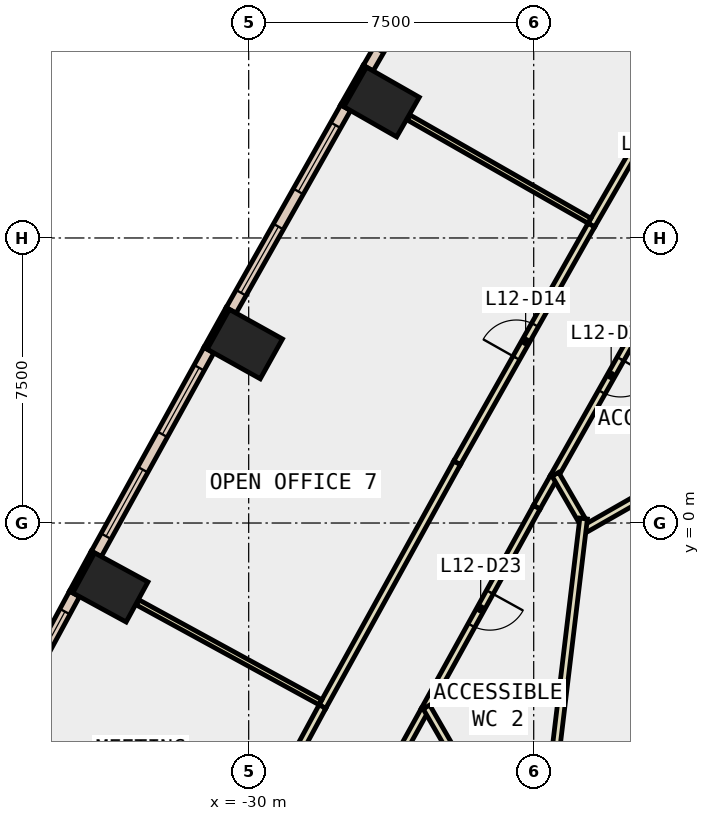
"""IFC4 building model, lengths in metres.
Left out: names, types, materials, properties, quantities, classifications, styles, units other than length and angle.
Written with IfcOpenShell. Run it as: python <this file> out.ifc"""

import sys

from ifc_helpers import new_model, si_unit, direction, frame, frame_2d, origin, origin_2d, place, context, subcontext, project, spatial, rectangle, extrude, element, fill, save


model = new_model("IFC4")
c1 = context("Model", 3, precision=1e-05, world=origin(), true_north=direction((0.0, 1.0)))
c2 = subcontext(c1, "Body", "Model", "MODEL_VIEW")
j1 = project(units=[si_unit("LENGTHUNIT", "METRE"), si_unit("PLANEANGLEUNIT", "RADIAN")], contexts=[c1])
p1 = place(None, origin())
s1 = spatial("IfcSite", under=j1, at=p1, CompositionType="ELEMENT")
p2 = place(p1, origin())
s2 = spatial("IfcBuilding", under=s1, at=p2, CompositionType="ELEMENT")
p3 = place(p2, frame((0.0, 0.0, 60.2)))
s3 = spatial("IfcBuildingStorey", under=s2, at=p3, CompositionType="ELEMENT", Elevation=60.2)
for number, where, z_axis, x_axis in (
    (1, (-26.503, 11.078, -0.4), (0.0, 0.0, 1.0), (0.496, 0.869, 0.0)),
    (2, (-30.102, 4.708, -0.4), (0.0, 0.0, 1.0), (0.487, 0.873, 0.0)),
    (3, (-33.64, -1.695, -0.4), (0.0, 0.0, 1.0), (0.478, 0.878, 0.0)),
):
    element("IfcColumn", number, at=place(p3, frame(where, z_axis=z_axis, x_axis=x_axis)), inside=s3, PredefinedType="COLUMN", context=c2, shape_type="SweptSolid", body=[
        extrude(rectangle(XDim=1.2, YDim=1.6, at=origin_2d()), origin(), (0.0, 0.0, 1.0), 4.2),
    ])
p4 = place(p3, frame((-26.944, 12.02, 0.0), z_axis=(0.0, 0.0, 1.0), x_axis=(-0.495854054996, -0.868405870629, 0.0)))
e4 = element("IfcWall", 4, at=p4, inside=s3, PredefinedType="STANDARD", context=c2, shape_type="SweptSolid", body=[
    extrude(rectangle(XDim=1.2, YDim=0.1, at=frame_2d((0.6, 0.0))), origin(), (0.0, 0.0, 1.0), 3.8),
])
p5 = place(p3, frame((-30.552, 5.646, 0.0), z_axis=(0.0, 0.0, 1.0), x_axis=(-0.486730996044, -0.87355190887, 0.0)))
e5 = element("IfcWall", 5, at=p5, inside=s3, PredefinedType="STANDARD", context=c2, shape_type="SweptSolid", body=[
    extrude(rectangle(XDim=1.2, YDim=0.1, at=frame_2d((0.6, 0.0))), origin(), (0.0, 0.0, 1.0), 3.8),
])
p6 = place(p3, frame((-34.099, -0.762, 0.0), z_axis=(0.0, 0.0, 1.0), x_axis=(-0.478267644701, -0.878214131082, 0.0)))
e6 = element("IfcWall", 6, at=p6, inside=s3, PredefinedType="STANDARD", context=c2, shape_type="SweptSolid", body=[
    extrude(rectangle(XDim=1.2, YDim=0.1, at=frame_2d((0.6, 0.0))), origin(), (0.0, 0.0, 1.0), 3.8),
])
p7 = place(p3, frame((-23.793, 17.273, 0.0), z_axis=(0.0, 0.0, 1.0), x_axis=(-0.499903021601, -0.86608138705, 0.0)))
e7 = element("IfcWall", 7, at=p7, inside=s3, PredefinedType="STANDARD", context=c2, shape_type="SweptSolid", body=[
    extrude(rectangle(XDim=6.125, YDim=0.3, at=frame_2d((3.062, 0.0))), origin(), (0.0, 0.0, 1.0), 3.8),
])
p8 = place(p7, frame((0.531, 0.0, 0.9)))
e8 = element("IfcOpeningElement", 8, at=p8, cuts=e7, PredefinedType="OPENING", context=c2, shape_type="SweptSolid", body=[
    extrude(rectangle(XDim=2.0, YDim=2.6, at=frame_2d((1.0, 1.3))), frame((0.0, 0.16, 0.0), z_axis=(0.0, -1.0, 0.0), x_axis=(1.0, 0.0, 0.0)), (0.0, 0.0, 1.0), 0.32),
])
p9 = place(p7, frame((3.594, 0.0, 0.9)))
e9 = element("IfcOpeningElement", 9, at=p9, cuts=e7, PredefinedType="OPENING", context=c2, shape_type="SweptSolid", body=[
    extrude(rectangle(XDim=2.0, YDim=2.6, at=frame_2d((1.0, 1.3))), frame((0.0, 0.16, 0.0), z_axis=(0.0, -1.0, 0.0), x_axis=(1.0, 0.0, 0.0)), (0.0, 0.0, 1.0), 0.32),
])
p10 = place(p3, frame((-27.449, 10.928, 0.0), z_axis=(0.0, 0.0, 1.0), x_axis=(-0.491887822214, -0.870658584267, 0.0)))
e10 = element("IfcWall", 10, at=p10, inside=s3, PredefinedType="STANDARD", context=c2, shape_type="SweptSolid", body=[
    extrude(rectangle(XDim=6.125, YDim=0.3, at=frame_2d((3.062, 0.0))), origin(), (0.0, 0.0, 1.0), 3.8),
])
p11 = place(p10, frame((0.531, 0.0, 0.9)))
e11 = element("IfcOpeningElement", 11, at=p11, cuts=e10, PredefinedType="OPENING", context=c2, shape_type="SweptSolid", body=[
    extrude(rectangle(XDim=2.0, YDim=2.6, at=frame_2d((1.0, 1.3))), frame((0.0, 0.16, 0.0), z_axis=(0.0, -1.0, 0.0), x_axis=(1.0, 0.0, 0.0)), (0.0, 0.0, 1.0), 0.32),
])
p12 = place(p10, frame((3.594, 0.0, 0.9)))
e12 = element("IfcOpeningElement", 12, at=p12, cuts=e10, PredefinedType="OPENING", context=c2, shape_type="SweptSolid", body=[
    extrude(rectangle(XDim=2.0, YDim=2.6, at=frame_2d((1.0, 1.3))), frame((0.0, 0.16, 0.0), z_axis=(0.0, -1.0, 0.0), x_axis=(1.0, 0.0, 0.0)), (0.0, 0.0, 1.0), 0.32),
])
p13 = place(p3, frame((-31.047, 4.549, 0.0), z_axis=(0.0, 0.0, 1.0), x_axis=(-0.483587271547, -0.875296150339, 0.0)))
e13 = element("IfcWall", 13, at=p13, inside=s3, PredefinedType="STANDARD", context=c2, shape_type="SweptSolid", body=[
    extrude(rectangle(XDim=6.125, YDim=0.3, at=frame_2d((3.062, 0.0))), origin(), (0.0, 0.0, 1.0), 3.8),
])
p14 = place(p13, frame((0.531, 0.0, 0.9)))
e14 = element("IfcOpeningElement", 14, at=p14, cuts=e13, PredefinedType="OPENING", context=c2, shape_type="SweptSolid", body=[
    extrude(rectangle(XDim=2.0, YDim=2.6, at=frame_2d((1.0, 1.3))), frame((0.0, 0.16, 0.0), z_axis=(0.0, -1.0, 0.0), x_axis=(1.0, 0.0, 0.0)), (0.0, 0.0, 1.0), 0.32),
])
p15 = place(p13, frame((3.594, 0.0, 0.9)))
e15 = element("IfcOpeningElement", 15, at=p15, cuts=e13, PredefinedType="OPENING", context=c2, shape_type="SweptSolid", body=[
    extrude(rectangle(XDim=2.0, YDim=2.6, at=frame_2d((1.0, 1.3))), frame((0.0, 0.16, 0.0), z_axis=(0.0, -1.0, 0.0), x_axis=(1.0, 0.0, 0.0)), (0.0, 0.0, 1.0), 0.32),
])
p16 = place(p3, frame((-34.583, -1.864, 0.0), z_axis=(0.0, 0.0, 1.0), x_axis=(-0.475413659872, -0.879762383833, 0.0)))
e16 = element("IfcWall", 16, at=p16, inside=s3, PredefinedType="STANDARD", context=c2, shape_type="SweptSolid", body=[
    extrude(rectangle(XDim=6.125, YDim=0.3, at=frame_2d((3.063, 0.0))), origin(), (0.0, 0.0, 1.0), 3.8),
])
p17 = place(p16, frame((0.531, 0.0, 0.9)))
e17 = element("IfcOpeningElement", 17, at=p17, cuts=e16, PredefinedType="OPENING", context=c2, shape_type="SweptSolid", body=[
    extrude(rectangle(XDim=2.0, YDim=2.6, at=frame_2d((1.0, 1.3))), frame((0.0, 0.16, 0.0), z_axis=(0.0, -1.0, 0.0), x_axis=(1.0, 0.0, 0.0)), (0.0, 0.0, 1.0), 0.32),
])
p18 = place(p16, frame((3.594, 0.0, 0.9)))
e18 = element("IfcOpeningElement", 18, at=p18, cuts=e16, PredefinedType="OPENING", context=c2, shape_type="SweptSolid", body=[
    extrude(rectangle(XDim=2.0, YDim=2.6, at=frame_2d((1.0, 1.3))), frame((0.0, 0.16, 0.0), z_axis=(0.0, -1.0, 0.0), x_axis=(1.0, 0.0, 0.0)), (0.0, 0.0, 1.0), 0.32),
])
p19 = place(p3, frame((-18.945, 6.567, 0.0), z_axis=(0.0, 0.0, 1.0), x_axis=(-0.491840751019, -0.87068517596, 0.0)))
e19 = element("IfcWall", 19, at=p19, inside=s3, PredefinedType="PARTITIONING", context=c2, shape_type="SweptSolid", body=[
    extrude(rectangle(XDim=6.168, YDim=0.2, at=frame_2d((3.084, 0.0))), origin(), (0.0, 0.0, 1.0), 3.8),
])
p20 = place(p19, frame((2.584, 0.0, 0.0)))
e20 = element("IfcOpeningElement", 20, at=p20, cuts=e19, PredefinedType="OPENING", context=c2, shape_type="SweptSolid", body=[
    extrude(rectangle(XDim=1.0, YDim=2.1, at=frame_2d((0.5, 1.05))), frame((0.0, 0.11, 0.0), z_axis=(0.0, -1.0, 0.0), x_axis=(1.0, 0.0, 0.0)), (0.0, 0.0, 1.0), 0.22),
])
p21 = place(p3, frame((-25.371, -4.927, 0.0), z_axis=(0.0, 0.0, 1.0), x_axis=(-0.483899488004, -0.875123582993, 0.0)))
e21 = element("IfcWall", 21, at=p21, inside=s3, PredefinedType="PARTITIONING", context=c2, shape_type="SweptSolid", body=[
    extrude(rectangle(XDim=1.13, YDim=0.2, at=frame_2d((0.565, 0.0))), origin(), (0.0, 0.0, 1.0), 3.8),
])
p22 = place(p3, frame((-21.979, 1.196, 0.0), z_axis=(0.0, 0.0, 1.0), x_axis=(-0.491617674369, -0.870811151886, 0.0)))
e22 = element("IfcWall", 22, at=p22, inside=s3, PredefinedType="PARTITIONING", context=c2, shape_type="SweptSolid", body=[
    extrude(rectangle(XDim=0.897, YDim=0.2, at=frame_2d((0.448, 0.0))), origin(), (0.0, 0.0, 1.0), 3.8),
])
p23 = place(p3, frame((-22.42, 0.415, 0.0), z_axis=(0.0, 0.0, 1.0), x_axis=(-0.483559496818, -0.875311494861, 0.0)))
e23 = element("IfcWall", 23, at=p23, inside=s3, PredefinedType="PARTITIONING", context=c2, shape_type="SweptSolid", body=[
    extrude(rectangle(XDim=6.103, YDim=0.2, at=frame_2d((3.052, 0.0))), origin(), (0.0, 0.0, 1.0), 3.8),
])
p24 = place(p23, frame((2.552, 0.0, 0.0)))
e24 = element("IfcOpeningElement", 24, at=p24, cuts=e23, PredefinedType="OPENING", context=c2, shape_type="SweptSolid", body=[
    extrude(rectangle(XDim=1.0, YDim=2.1, at=frame_2d((0.5, 1.05))), frame((0.0, 0.11, 0.0), z_axis=(0.0, -1.0, 0.0), x_axis=(1.0, 0.0, 0.0)), (0.0, 0.0, 1.0), 0.22),
])
p25 = place(p3, frame((-17.356, 14.122, 0.0), z_axis=(0.0, 0.0, 1.0), x_axis=(-0.499946764175, -0.866056137321, 0.0)))
e25 = element("IfcWall", 25, at=p25, inside=s3, PredefinedType="PARTITIONING", context=c2, shape_type="SweptSolid", body=[
    extrude(rectangle(XDim=7.255, YDim=0.2, at=frame_2d((3.627, 0.0))), origin(), (0.0, 0.0, 1.0), 3.8),
])
p26 = place(p25, frame((3.052, 0.0, 0.0)))
e26 = element("IfcOpeningElement", 26, at=p26, cuts=e25, PredefinedType="OPENING", context=c2, shape_type="SweptSolid", body=[
    extrude(rectangle(XDim=1.0, YDim=2.1, at=frame_2d((0.5, 1.05))), frame((0.0, 0.11, 0.0), z_axis=(0.0, -1.0, 0.0), x_axis=(1.0, 0.0, 0.0)), (0.0, 0.0, 1.0), 0.22),
])
p27 = place(p3, frame((-28.06, -4.831, 0.0), z_axis=(0.0, 0.0, 1.0), x_axis=(0.483631054848, 0.875271959328, 0.0)))
e27 = element("IfcWall", 27, at=p27, inside=s3, PredefinedType="PARTITIONING", context=c2, shape_type="SweptSolid", body=[
    extrude(rectangle(XDim=7.33, YDim=0.2, at=frame_2d((3.665, 0.0))), origin(), (0.0, 0.0, 1.0), 3.8),
])
p28 = place(p3, frame((-24.515, 1.585, 0.0), z_axis=(0.0, 0.0, 1.0), x_axis=(0.49174361417, 0.870740040381, 0.0)))
e28 = element("IfcWall", 28, at=p28, inside=s3, PredefinedType="PARTITIONING", context=c2, shape_type="SweptSolid", body=[
    extrude(rectangle(XDim=7.183, YDim=0.2, at=frame_2d((3.591, 0.0))), origin(), (0.0, 0.0, 1.0), 3.8),
])
p29 = place(p28, frame((3.166, 0.0, 0.0)))
e29 = element("IfcOpeningElement", 29, at=p29, cuts=e28, PredefinedType="OPENING", context=c2, shape_type="SweptSolid", body=[
    extrude(rectangle(XDim=1.0, YDim=2.1, at=frame_2d((0.5, 1.05))), frame((0.0, 0.11, 0.0), z_axis=(0.0, -1.0, 0.0), x_axis=(1.0, 0.0, 0.0)), (0.0, 0.0, 1.0), 0.22),
])
p30 = place(p3, frame((-31.509, -11.216, 0.0), z_axis=(0.0, 0.0, 1.0), x_axis=(0.475367159168, 0.879787510701, 0.0)))
e30 = element("IfcWall", 30, at=p30, inside=s3, PredefinedType="PARTITIONING", context=c2, shape_type="SweptSolid", body=[
    extrude(rectangle(XDim=7.257, YDim=0.2, at=frame_2d((3.629, 0.0))), origin(), (0.0, 0.0, 1.0), 3.8),
])
p31 = place(p30, frame((3.203, 0.0, 0.0)))
e31 = element("IfcOpeningElement", 31, at=p31, cuts=e30, PredefinedType="OPENING", context=c2, shape_type="SweptSolid", body=[
    extrude(rectangle(XDim=1.0, YDim=2.1, at=frame_2d((0.5, 1.05))), frame((0.0, 0.11, 0.0), z_axis=(0.0, -1.0, 0.0), x_axis=(1.0, 0.0, 0.0)), (0.0, 0.0, 1.0), 0.22),
])
p32 = place(p3, frame((-14.946, 3.387, 0.0), z_axis=(0.0, 0.0, 1.0), x_axis=(-0.868556003823, -0.4955910292, 0.0)))
e32 = element("IfcWall", 32, at=p32, inside=s3, PredefinedType="PARTITIONING", context=c2, shape_type="SweptSolid", body=[
    extrude(rectangle(XDim=7.199, YDim=0.2, at=frame_2d((3.6, 0.0))), origin(), (0.0, 0.0, 1.0), 3.8),
])
p33 = place(p3, frame((-21.249, 0.105, 0.0), z_axis=(0.0, 0.0, 1.0), x_axis=(-0.500442009317, 0.865770059144, 0.0)))
e33 = element("IfcWall", 33, at=p33, inside=s3, PredefinedType="PARTITIONING", context=c2, shape_type="SweptSolid", body=[
    extrude(rectangle(XDim=1.361, YDim=0.2, at=frame_2d((0.68, 0.0))), origin(), (0.0, 0.0, 1.0), 3.8),
])
p34 = place(p3, frame((-25.323, -4.84, 0.0), z_axis=(0.0, 0.0, 1.0), x_axis=(0.500070797646, -0.865984524886, 0.0)))
e34 = element("IfcWall", 34, at=p34, inside=s3, PredefinedType="PARTITIONING", context=c2, shape_type="SweptSolid", body=[
    extrude(rectangle(XDim=5.763, YDim=0.2, at=frame_2d((2.882, 0.0))), origin(), (0.0, 0.0, 1.0), 3.8),
])
p35 = place(p3, frame((-22.403, -10.017, 0.0), z_axis=(0.0, 0.0, 1.0), x_axis=(0.119143334217, 0.992877064853, 0.0)))
e35 = element("IfcWall", 35, at=p35, inside=s3, PredefinedType="PARTITIONING", context=c2, shape_type="SweptSolid", body=[
    extrude(rectangle(XDim=10.207, YDim=0.2, at=frame_2d((5.104, 0.0))), origin(), (0.0, 0.0, 1.0), 3.8),
])
p36 = place(p3, frame((-21.033, 7.953, 0.0), z_axis=(0.0, 0.0, 1.0), x_axis=(-0.868311678357, 0.496018980715, 0.0)))
e36 = element("IfcWall", 36, at=p36, inside=s3, PredefinedType="PARTITIONING", context=c2, shape_type="SweptSolid", body=[
    extrude(rectangle(XDim=5.48, YDim=0.15, at=frame_2d((2.74, 0.0))), origin(), (0.0, 0.0, 1.0), 3.8),
])
p37 = place(p3, frame((-28.111, -4.717, 0.0), z_axis=(0.0, 0.0, 1.0), x_axis=(-0.877558297547, 0.479469951515, 0.0)))
e37 = element("IfcWall", 37, at=p37, inside=s3, PredefinedType="PARTITIONING", context=c2, shape_type="SweptSolid", body=[
    extrude(rectangle(XDim=5.481, YDim=0.15, at=frame_2d((2.74, 0.0))), origin(), (0.0, 0.0, 1.0), 3.8),
])
p38 = place(p11, origin())
e38 = element("IfcWindow", 38, at=p38, inside=s3, PartitioningType="SINGLE_PANEL", PredefinedType="WINDOW", context=c2, shape_type="SweptSolid", body=[
    extrude(rectangle(XDim=2.0, YDim=2.6, at=frame_2d((1.0, 1.3))), frame((0.0, 0.03, 0.0), z_axis=(0.0, -1.0, 0.0), x_axis=(1.0, 0.0, 0.0)), (0.0, 0.0, 1.0), 0.06),
])
fill(e11, e38)
p39 = place(p12, origin())
e39 = element("IfcWindow", 39, at=p39, inside=s3, PartitioningType="SINGLE_PANEL", PredefinedType="WINDOW", context=c2, shape_type="SweptSolid", body=[
    extrude(rectangle(XDim=2.0, YDim=2.6, at=frame_2d((1.0, 1.3))), frame((0.0, 0.03, 0.0), z_axis=(0.0, -1.0, 0.0), x_axis=(1.0, 0.0, 0.0)), (0.0, 0.0, 1.0), 0.06),
])
fill(e12, e39)
p40 = place(p14, origin())
e40 = element("IfcWindow", 40, at=p40, inside=s3, PartitioningType="SINGLE_PANEL", PredefinedType="WINDOW", context=c2, shape_type="SweptSolid", body=[
    extrude(rectangle(XDim=2.0, YDim=2.6, at=frame_2d((1.0, 1.3))), frame((0.0, 0.03, 0.0), z_axis=(0.0, -1.0, 0.0), x_axis=(1.0, 0.0, 0.0)), (0.0, 0.0, 1.0), 0.06),
])
fill(e14, e40)
p41 = place(p15, origin())
e41 = element("IfcWindow", 41, at=p41, inside=s3, PartitioningType="SINGLE_PANEL", PredefinedType="WINDOW", context=c2, shape_type="SweptSolid", body=[
    extrude(rectangle(XDim=2.0, YDim=2.6, at=frame_2d((1.0, 1.3))), frame((0.0, 0.03, 0.0), z_axis=(0.0, -1.0, 0.0), x_axis=(1.0, 0.0, 0.0)), (0.0, 0.0, 1.0), 0.06),
])
fill(e15, e41)
p42 = place(p17, origin())
e42 = element("IfcWindow", 42, at=p42, inside=s3, PartitioningType="SINGLE_PANEL", PredefinedType="WINDOW", context=c2, shape_type="SweptSolid", body=[
    extrude(rectangle(XDim=2.0, YDim=2.6, at=frame_2d((1.0, 1.3))), frame((0.0, 0.03, 0.0), z_axis=(0.0, -1.0, 0.0), x_axis=(1.0, 0.0, 0.0)), (0.0, 0.0, 1.0), 0.06),
])
fill(e17, e42)
p43 = place(p29, origin())
e43 = element("IfcDoor", 43, at=p43, inside=s3, OperationType="SINGLE_SWING_RIGHT", PredefinedType="DOOR", context=c2, shape_type="SweptSolid", body=[
    extrude(rectangle(XDim=1.0, YDim=2.1, at=frame_2d((0.5, 1.05))), frame((0.0, 0.025, 0.0), z_axis=(0.0, -1.0, 0.0), x_axis=(1.0, 0.0, 0.0)), (0.0, 0.0, 1.0), 0.05),
])
fill(e29, e43)
p44 = place(p20, origin())
e44 = element("IfcDoor", 44, at=p44, inside=s3, OperationType="SINGLE_SWING_LEFT", PredefinedType="DOOR", context=c2, shape_type="SweptSolid", body=[
    extrude(rectangle(XDim=1.0, YDim=2.1, at=frame_2d((0.5, 1.05))), frame((0.0, 0.025, 0.0), z_axis=(0.0, -1.0, 0.0), x_axis=(1.0, 0.0, 0.0)), (0.0, 0.0, 1.0), 0.05),
])
fill(e20, e44)
p45 = place(p24, origin())
e45 = element("IfcDoor", 45, at=p45, inside=s3, OperationType="SINGLE_SWING_LEFT", PredefinedType="DOOR", context=c2, shape_type="SweptSolid", body=[
    extrude(rectangle(XDim=1.0, YDim=2.1, at=frame_2d((0.5, 1.05))), frame((0.0, 0.025, 0.0), z_axis=(0.0, -1.0, 0.0), x_axis=(1.0, 0.0, 0.0)), (0.0, 0.0, 1.0), 0.05),
])
fill(e24, e45)
save(model, sys.argv[1])
